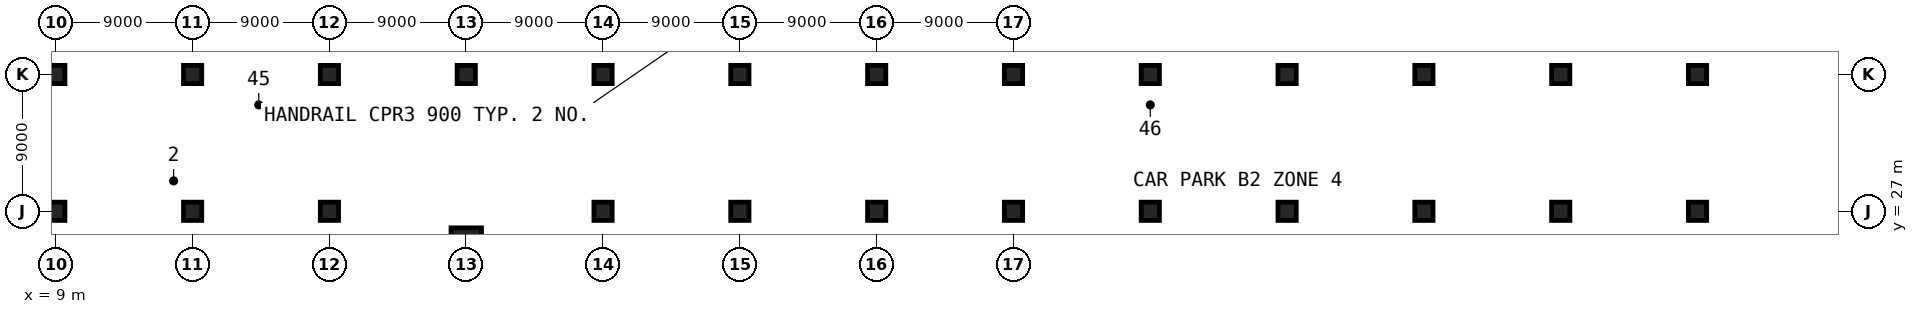
"""IFC4 building model, lengths in metres.
Left out: names, types, materials, properties, quantities, classifications, styles, units other than length and angle.
Written with IfcOpenShell. Run it as: python <this file> out.ifc"""

import sys

from ifc_helpers import new_model, si_unit, direction, frame, origin, origin_2d, place, context, subcontext, project, spatial, rectangle, extrude, element, save


model = new_model("IFC4")
c1 = context("Model", 3, precision=1e-05, world=origin(), true_north=direction((0.0, 1.0)))
c2 = subcontext(c1, "Body", "Model", "MODEL_VIEW")
j1 = project(units=[si_unit("LENGTHUNIT", "METRE"), si_unit("PLANEANGLEUNIT", "RADIAN")], contexts=[c1])
p1 = place(None, origin())
s1 = spatial("IfcSite", under=j1, at=p1, CompositionType="ELEMENT")
p2 = place(p1, origin())
s2 = spatial("IfcBuilding", under=s1, at=p2, CompositionType="ELEMENT")
p3 = place(p2, frame((0.0, 0.0, -9.0)))
s3 = spatial("IfcBuildingStorey", under=s2, at=p3, CompositionType="ELEMENT", Elevation=-9.0)
for number, where, z_axis, x_axis in (
    (1, (9.0, 27.0, 0.0), (0.0, 0.0, 1.0), (1.0, 0.0, 0.0)),
    (2, (9.0, 36.0, 0.0), (0.0, 0.0, 1.0), (1.0, 0.0, 0.0)),
    (3, (18.0, 27.0, 0.0), (0.0, 0.0, 1.0), (1.0, 0.0, 0.0)),
    (4, (18.0, 36.0, 0.0), (0.0, 0.0, 1.0), (1.0, 0.0, 0.0)),
    (5, (27.0, 27.0, 0.0), (0.0, 0.0, 1.0), (1.0, 0.0, 0.0)),
    (6, (27.0, 36.0, 0.0), (0.0, 0.0, 1.0), (1.0, 0.0, 0.0)),
    (7, (36.0, 36.0, 0.0), (0.0, 0.0, 1.0), (1.0, 0.0, 0.0)),
    (8, (45.0, 27.0, 0.0), (0.0, 0.0, 1.0), (1.0, 0.0, 0.0)),
    (9, (45.0, 36.0, 0.0), (0.0, 0.0, 1.0), (1.0, 0.0, 0.0)),
    (10, (54.0, 27.0, 0.0), (0.0, 0.0, 1.0), (1.0, 0.0, 0.0)),
    (11, (54.0, 36.0, 0.0), (0.0, 0.0, 1.0), (1.0, 0.0, 0.0)),
    (12, (63.0, 27.0, 0.0), (0.0, 0.0, 1.0), (1.0, 0.0, 0.0)),
    (13, (63.0, 36.0, 0.0), (0.0, 0.0, 1.0), (1.0, 0.0, 0.0)),
    (14, (72.0, 27.0, 0.0), (0.0, 0.0, 1.0), (1.0, 0.0, 0.0)),
    (15, (72.0, 36.0, 0.0), (0.0, 0.0, 1.0), (1.0, 0.0, 0.0)),
    (16, (81.0, 27.0, 0.0), (0.0, 0.0, 1.0), (1.0, 0.0, 0.0)),
    (17, (81.0, 36.0, 0.0), (0.0, 0.0, 1.0), (1.0, 0.0, 0.0)),
    (18, (90.0, 27.0, 0.0), (0.0, 0.0, 1.0), (1.0, 0.0, 0.0)),
    (19, (90.0, 36.0, 0.0), (0.0, 0.0, 1.0), (1.0, 0.0, 0.0)),
    (20, (99.0, 27.0, 0.0), (0.0, 0.0, 1.0), (1.0, 0.0, 0.0)),
    (21, (99.0, 36.0, 0.0), (0.0, 0.0, 1.0), (1.0, 0.0, 0.0)),
    (22, (108.0, 27.0, 0.0), (0.0, 0.0, 1.0), (1.0, 0.0, 0.0)),
    (23, (108.0, 36.0, 0.0), (0.0, 0.0, 1.0), (1.0, 0.0, 0.0)),
    (24, (117.0, 27.0, 0.0), (0.0, 0.0, 1.0), (1.0, 0.0, 0.0)),
    (25, (117.0, 36.0, 0.0), (0.0, 0.0, 1.0), (1.0, 0.0, 0.0)),
):
    element("IfcColumn", number, at=place(p3, frame(where, z_axis=z_axis, x_axis=x_axis)), inside=s3, PredefinedType="COLUMN", context=c2, shape_type="SweptSolid", body=[
        extrude(rectangle(XDim=1.2, YDim=1.2, at=origin_2d()), origin(), (0.0, 0.0, 1.0), 4.5),
    ])
p4 = place(p3, frame((36.0, 24.91, 0.0), z_axis=(0.0, 0.0, 1.0), x_axis=(0.0, 1.0, 0.0)))
e26 = element("IfcColumn", 26, at=p4, inside=s3, PredefinedType="COLUMN", context=c2, shape_type="SweptSolid", body=[
    extrude(rectangle(XDim=2.0, YDim=2.0, at=origin_2d()), origin(), (0.0, 0.0, 1.0), 4.5),
])
save(model, sys.argv[1])
